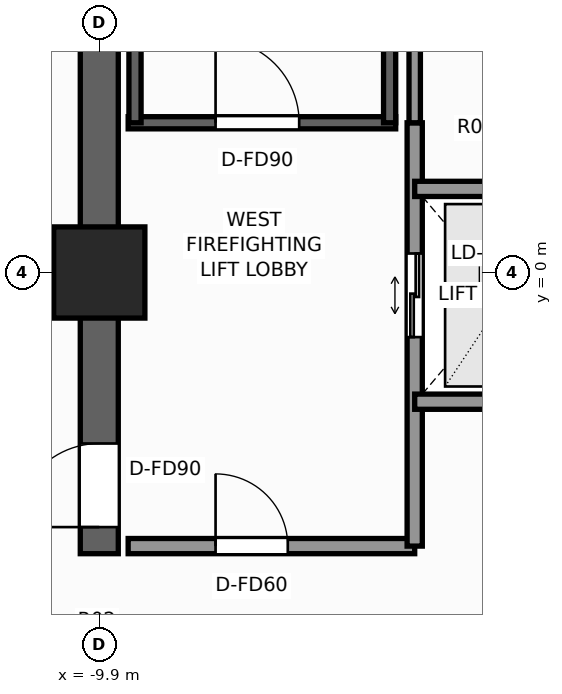
"""IFC4 building model, lengths in metres.
Left out: names, types, materials, properties, quantities, classifications, styles, units other than length and angle.
Written with IfcOpenShell. Run it as: python <this file> out.ifc"""

import sys

from ifc_helpers import new_model, si_unit, direction, frame, frame_2d, origin, origin_2d, place, context, subcontext, project, spatial, rectangle, extrude, element, fill, save


model = new_model("IFC4")
c1 = context("Model", 3, precision=1e-05, world=origin(), true_north=direction((0.0, 1.0)))
c2 = subcontext(c1, "Body", "Model", "MODEL_VIEW")
j1 = project(units=[si_unit("LENGTHUNIT", "METRE"), si_unit("PLANEANGLEUNIT", "RADIAN")], contexts=[c1])
p1 = place(None, origin())
s1 = spatial("IfcSite", under=j1, at=p1, CompositionType="ELEMENT")
p2 = place(p1, origin())
s2 = spatial("IfcBuilding", under=s1, at=p2, CompositionType="ELEMENT")
p3 = place(p2, frame((0.0, 0.0, 183.3)))
s3 = spatial("IfcBuildingStorey", under=s2, at=p3, CompositionType="ELEMENT", Elevation=183.3)
p4 = place(p3, frame((-9.9, -3.7, 0.0), z_axis=(0.0, 0.0, 1.0), x_axis=(0.0, 1.0, 0.0)))
e1 = element("IfcWall", 1, at=p4, inside=s3, PredefinedType="SHEAR", context=c2, shape_type="SweptSolid", body=[
    extrude(rectangle(XDim=13.35, YDim=0.5, at=frame_2d((6.675, 0.0))), origin(), (0.0, 0.0, 1.0), 3.3),
])
p5 = place(p4, frame((0.35, 0.0, 0.0)))
e2 = element("IfcOpeningElement", 2, at=p5, cuts=e1, PredefinedType="OPENING", context=c2, shape_type="SweptSolid", body=[
    extrude(rectangle(XDim=1.1, YDim=2.2, at=frame_2d((0.55, 1.1))), frame((0.0, 0.26, 0.0), z_axis=(0.0, -1.0, 0.0), x_axis=(1.0, 0.0, 0.0)), (0.0, 0.0, 1.0), 0.52),
])
p6 = place(p3, frame((-9.9, 0.0, 0.0), z_axis=(0.0, 0.0, 1.0), x_axis=(1.0, 0.0, 0.0)))
e3 = element("IfcColumn", 3, at=p6, inside=s3, PredefinedType="COLUMN", context=c2, shape_type="SweptSolid", body=[
    extrude(rectangle(XDim=1.2, YDim=1.2, at=origin_2d()), origin(), (0.0, 0.0, 1.0), 3.3),
])
p7 = place(p3, frame((-9.52, 1.97, 0.0), z_axis=(0.0, 0.0, 1.0), x_axis=(1.0, 0.0, 0.0)))
e4 = element("IfcWall", 4, at=p7, inside=s3, PredefinedType="SHEAR", context=c2, shape_type="SweptSolid", body=[
    extrude(rectangle(XDim=3.52, YDim=0.16, at=frame_2d((1.76, 0.0))), origin(), (0.0, 0.0, 1.0), 3.3),
])
p8 = place(p7, frame((1.15, 0.0, 0.0)))
e5 = element("IfcOpeningElement", 5, at=p8, cuts=e4, PredefinedType="OPENING", context=c2, shape_type="SweptSolid", body=[
    extrude(rectangle(XDim=1.1, YDim=2.2, at=frame_2d((0.55, 1.1))), frame((0.0, 0.09, 0.0), z_axis=(0.0, -1.0, 0.0), x_axis=(1.0, 0.0, 0.0)), (0.0, 0.0, 1.0), 0.18),
])
for number, where, z_axis, x_axis in (
    (6, (-9.43, 1.97, 0.0), (0.0, 0.0, 1.0), (0.0, 1.0, 0.0)),
    (7, (-6.08, 1.97, 0.0), (0.0, 0.0, 1.0), (0.0, 1.0, 0.0)),
):
    element("IfcWall", number, at=place(p3, frame(where, z_axis=z_axis, x_axis=x_axis)), inside=s3, PredefinedType="SHEAR", context=c2, shape_type="SweptSolid", body=[
        extrude(rectangle(XDim=7.56, YDim=0.16, at=frame_2d((3.78, 0.0))), origin(), (0.0, 0.0, 1.0), 3.3),
    ])
p9 = place(p3, frame((-9.52, -3.6, 0.0), z_axis=(0.0, 0.0, 1.0), x_axis=(1.0, 0.0, 0.0)))
e8 = element("IfcWall", 8, at=p9, inside=s3, PredefinedType="SOLIDWALL", context=c2, shape_type="SweptSolid", body=[
    extrude(rectangle(XDim=3.77, YDim=0.2, at=frame_2d((1.885, 0.0))), origin(), (0.0, 0.0, 1.0), 3.08),
])
p10 = place(p9, frame((1.15, 0.0, 0.0)))
e9 = element("IfcOpeningElement", 9, at=p10, cuts=e8, PredefinedType="OPENING", context=c2, shape_type="SweptSolid", body=[
    extrude(rectangle(XDim=0.95, YDim=2.06, at=frame_2d((0.475, 1.03))), frame((0.0, 0.11, 0.0), z_axis=(0.0, -1.0, 0.0), x_axis=(1.0, 0.0, 0.0)), (0.0, 0.0, 1.0), 0.22),
])
p11 = place(p3, frame((-5.75, -3.6, 0.0), z_axis=(0.0, 0.0, 1.0), x_axis=(0.0, 1.0, 0.0)))
e10 = element("IfcWall", 10, at=p11, inside=s3, PredefinedType="SOLIDWALL", context=c2, shape_type="SweptSolid", body=[
    extrude(rectangle(XDim=5.57, YDim=0.2, at=frame_2d((2.785, 0.0))), origin(), (0.0, 0.0, 1.0), 2.715),
])
p12 = place(p11, frame((2.75, 0.0, 0.0)))
e11 = element("IfcOpeningElement", 11, at=p12, cuts=e10, PredefinedType="OPENING", context=c2, shape_type="SweptSolid", body=[
    extrude(rectangle(XDim=1.1, YDim=2.2, at=frame_2d((0.55, 1.1))), frame((0.0, 0.11, 0.0), z_axis=(0.0, -1.0, 0.0), x_axis=(1.0, 0.0, 0.0)), (0.0, 0.0, 1.0), 0.22),
])
for number, where, z_axis, x_axis in (
    (12, (-5.75, -1.7, 0.0), (0.0, 0.0, 1.0), (1.0, 0.0, 0.0)),
    (13, (-5.75, 1.1, 0.0), (0.0, 0.0, 1.0), (1.0, 0.0, 0.0)),
):
    element("IfcWall", number, at=place(p3, frame(where, z_axis=z_axis, x_axis=x_axis)), inside=s3, PredefinedType="SOLIDWALL", context=c2, shape_type="SweptSolid", body=[
        extrude(rectangle(XDim=2.4, YDim=0.2, at=frame_2d((1.2, 0.0))), origin(), (0.0, 0.0, 1.0), 3.08),
    ])
p13 = place(p3, frame((-5.75, 1.97, 0.0), z_axis=(0.0, 0.0, 1.0), x_axis=(0.0, 1.0, 0.0)))
e14 = element("IfcWall", 14, at=p13, inside=s3, PredefinedType="PARTITIONING", context=c2, shape_type="SweptSolid", body=[
    extrude(rectangle(XDim=2.33, YDim=0.15, at=frame_2d((1.165, 0.0))), origin(), (0.0, 0.0, 1.0), 2.715),
])
p14 = place(p8, origin())
e15 = element("IfcDoor", 15, at=p14, inside=s3, OperationType="SINGLE_SWING_LEFT", PredefinedType="DOOR", context=c2, shape_type="SweptSolid", body=[
    extrude(rectangle(XDim=1.1, YDim=2.2, at=frame_2d((0.55, 1.1))), frame((0.0, 0.025, 0.0), z_axis=(0.0, -1.0, 0.0), x_axis=(1.0, 0.0, 0.0)), (0.0, 0.0, 1.0), 0.05),
])
fill(e5, e15)
p15 = place(p5, origin())
e16 = element("IfcDoor", 16, at=p15, inside=s3, OperationType="SINGLE_SWING_LEFT", PredefinedType="DOOR", context=c2, shape_type="SweptSolid", body=[
    extrude(rectangle(XDim=1.1, YDim=2.2, at=frame_2d((0.55, 1.1))), frame((0.0, 0.025, 0.0), z_axis=(0.0, -1.0, 0.0), x_axis=(1.0, 0.0, 0.0)), (0.0, 0.0, 1.0), 0.05),
])
fill(e2, e16)
p16 = place(p12, origin())
e17 = element("IfcDoor", 17, at=p16, inside=s3, OperationType="DOUBLE_DOOR_SLIDING", PredefinedType="DOOR", context=c2, shape_type="SweptSolid", body=[
    extrude(rectangle(XDim=1.1, YDim=2.2, at=frame_2d((0.55, 1.1))), frame((0.0, 0.025, 0.0), z_axis=(0.0, -1.0, 0.0), x_axis=(1.0, 0.0, 0.0)), (0.0, 0.0, 1.0), 0.05),
])
fill(e11, e17)
p17 = place(p10, origin())
e18 = element("IfcDoor", 18, at=p17, inside=s3, OperationType="SINGLE_SWING_LEFT", PredefinedType="DOOR", context=c2, shape_type="SweptSolid", body=[
    extrude(rectangle(XDim=0.95, YDim=2.06, at=frame_2d((0.475, 1.03))), frame((0.0, 0.025, 0.0), z_axis=(0.0, -1.0, 0.0), x_axis=(1.0, 0.0, 0.0)), (0.0, 0.0, 1.0), 0.05),
])
fill(e9, e18)
save(model, sys.argv[1])
